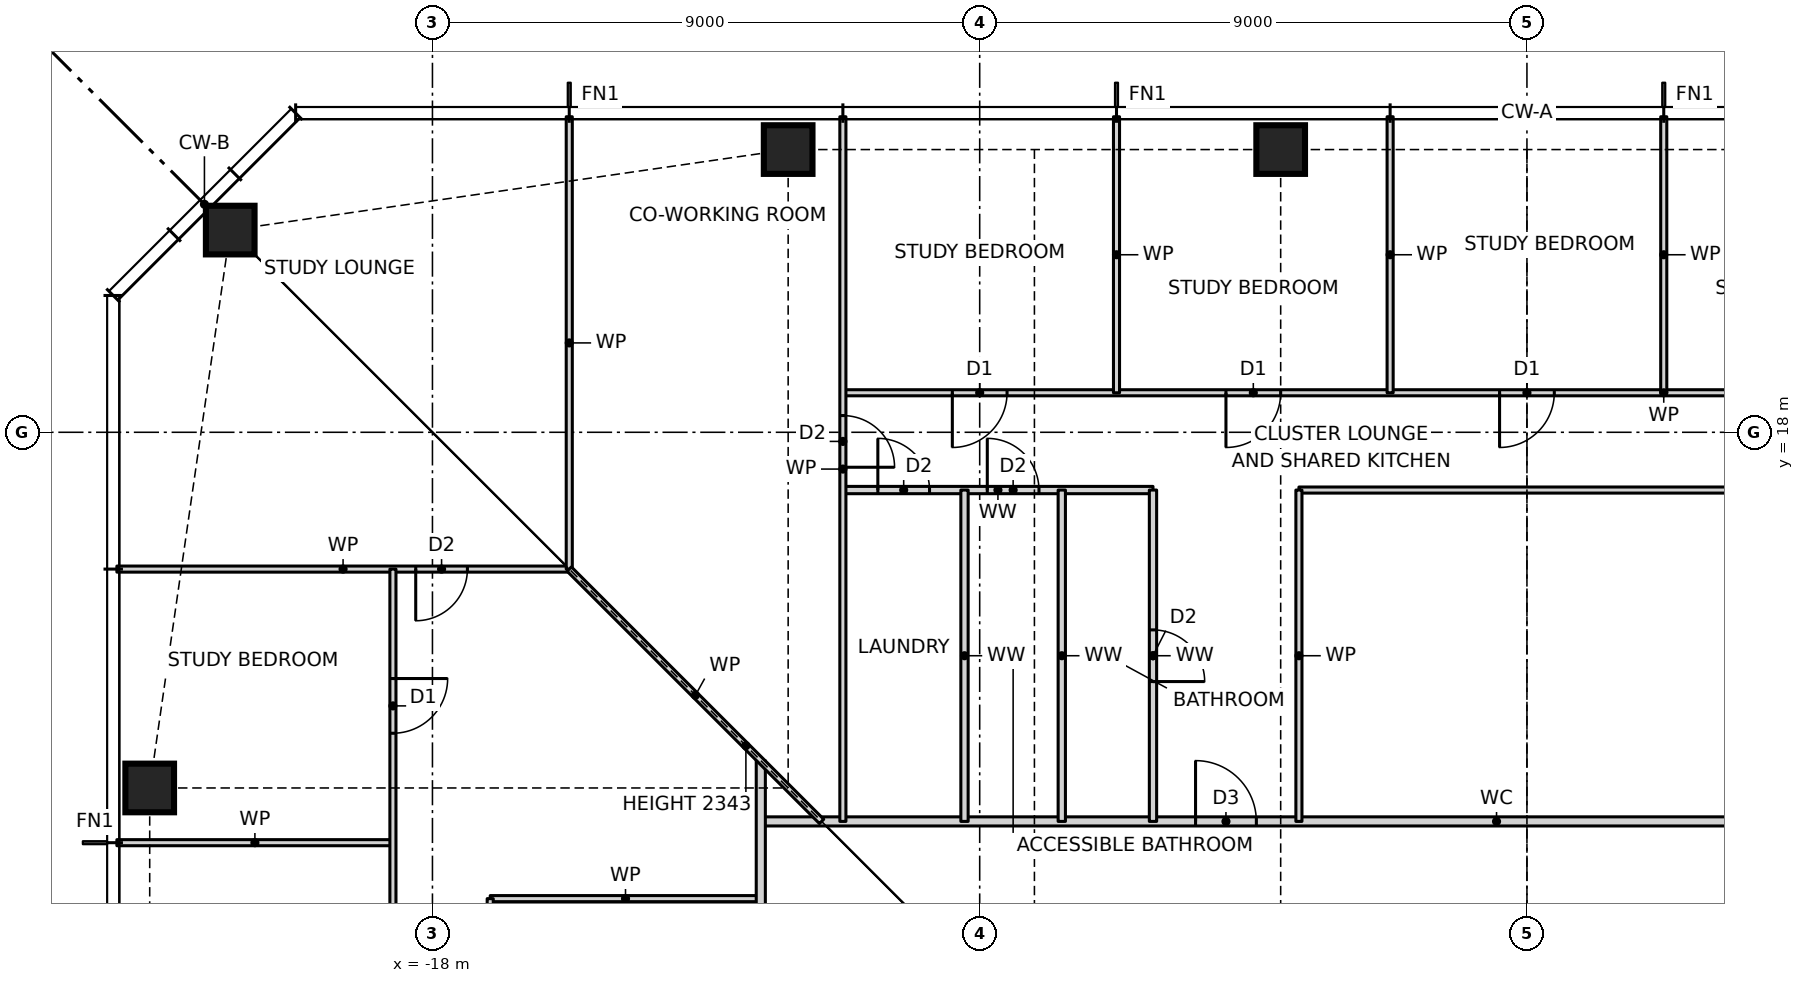
"""IFC4 building model, lengths in metres.
Left out: names, types, materials, properties, quantities, classifications, styles, units other than length and angle.
Written with IfcOpenShell. Run it as: python <this file> out.ifc"""

import sys

from ifc_helpers import new_model, si_unit, direction, frame, frame_2d, origin, origin_2d, place, context, subcontext, project, spatial, rectangle, hollow_rectangle, extrude, element, fill, save


model = new_model("IFC4")
c1 = context("Model", 3, precision=1e-05, world=origin(), true_north=direction((0.0, 1.0)))
c2 = subcontext(c1, "Body", "Model", "MODEL_VIEW")
j1 = project(units=[si_unit("LENGTHUNIT", "METRE"), si_unit("PLANEANGLEUNIT", "RADIAN")], contexts=[c1])
p1 = place(None, origin())
s1 = spatial("IfcSite", under=j1, at=p1, CompositionType="ELEMENT")
p2 = place(p1, origin())
s2 = spatial("IfcBuilding", under=s1, at=p2, CompositionType="ELEMENT")
p3 = place(p2, frame((0.0, 0.0, 46.5)))
s3 = spatial("IfcBuildingStorey", under=s2, at=p3, CompositionType="ELEMENT", Elevation=46.5)
for number, where, z_axis, x_axis in (
    (1, (-4.05, 22.65, 0.0), (0.0, 0.0, 1.0), (1.0, 0.0, 0.0)),
    (2, (-12.15, 22.65, 0.0), (0.0, 0.0, 1.0), (1.0, 0.0, 0.0)),
    (3, (-21.326, 21.326, 0.0), (0.0, 0.0, 1.0), (1.0, 0.0, 0.0)),
    (4, (-22.65, 12.15, 0.0), (0.0, 0.0, 1.0), (1.0, 0.0, 0.0)),
):
    element("IfcColumn", number, at=place(p3, frame(where, z_axis=z_axis, x_axis=x_axis)), inside=s3, PredefinedType="COLUMN", context=c2, shape_type="SweptSolid", body=[
        extrude(hollow_rectangle(XDim=0.8, YDim=0.8, WallThickness=0.09, at=origin_2d()), origin(), (0.0, 0.0, 1.0), 3.5),
    ])
p4 = place(p3, frame((-17.05, 10.33, 0.0), z_axis=(0.0, 0.0, 1.0), x_axis=(1.0, 0.0, 0.0)))
e5 = element("IfcWall", 5, at=p4, inside=s3, PredefinedType="PARTITIONING", context=c2, shape_type="SweptSolid", body=[
    extrude(rectangle(XDim=4.45, YDim=0.1, at=frame_2d((2.225, 0.0))), origin(), (0.0, 0.0, 1.0), 3.27),
])
p5 = place(p3, frame((-23.19, 11.25, 0.0), z_axis=(0.0, 0.0, 1.0), x_axis=(1.0, 0.0, 0.0)))
e6 = element("IfcWall", 6, at=p5, inside=s3, PredefinedType="PARTITIONING", context=c2, shape_type="SweptSolid", body=[
    extrude(rectangle(XDim=4.54, YDim=0.1, at=frame_2d((2.27, 0.0))), origin(), (0.0, 0.0, 1.0), 3.27),
])
p6 = place(p3, frame((-12.6, 11.6, 0.0), z_axis=(0.0, 0.0, 1.0), x_axis=(1.0, 0.0, 0.0)))
e7 = element("IfcWall", 7, at=p6, inside=s3, PredefinedType="PARTITIONING", context=c2, shape_type="SweptSolid", body=[
    extrude(rectangle(XDim=24.2, YDim=0.15, at=frame_2d((12.1, 0.0))), origin(), (0.0, 0.0, 1.0), 3.27),
])
p7 = place(p6, frame((7.15, 0.0, 0.0)))
e8 = element("IfcOpeningElement", 8, at=p7, cuts=e7, PredefinedType="OPENING", context=c2, shape_type="SweptSolid", body=[
    extrude(rectangle(XDim=1.0, YDim=2.1, at=frame_2d((0.5, 1.05))), frame((0.0, 0.085, 0.0), z_axis=(0.0, -1.0, 0.0), x_axis=(1.0, 0.0, 0.0)), (0.0, 0.0, 1.0), 0.17),
])
p8 = place(p3, frame((-23.19, 15.75, 0.0), z_axis=(0.0, 0.0, 1.0), x_axis=(1.0, 0.0, 0.0)))
e9 = element("IfcWall", 9, at=p8, inside=s3, PredefinedType="PARTITIONING", context=c2, shape_type="SweptSolid", body=[
    extrude(rectangle(XDim=7.44, YDim=0.1, at=frame_2d((3.72, 0.0))), origin(), (0.0, 0.0, 1.0), 3.27),
])
p9 = place(p8, frame((4.915, 0.0, 0.0)))
e10 = element("IfcOpeningElement", 10, at=p9, cuts=e9, PredefinedType="OPENING", context=c2, shape_type="SweptSolid", body=[
    extrude(rectangle(XDim=0.85, YDim=2.1, at=frame_2d((0.425, 1.05))), frame((0.0, 0.06, 0.0), z_axis=(0.0, -1.0, 0.0), x_axis=(1.0, 0.0, 0.0)), (0.0, 0.0, 1.0), 0.12),
])
p10 = place(p3, frame((-11.25, 17.05, 0.0), z_axis=(0.0, 0.0, 1.0), x_axis=(1.0, 0.0, 0.0)))
e11 = element("IfcWall", 11, at=p10, inside=s3, PredefinedType="PARTITIONING", context=c2, shape_type="SweptSolid", body=[
    extrude(rectangle(XDim=5.1, YDim=0.12, at=frame_2d((2.55, 0.0))), origin(), (0.0, 0.0, 1.0), 3.27),
])
p11 = place(p10, frame((2.375, 0.0, 0.0)))
e12 = element("IfcOpeningElement", 12, at=p11, cuts=e11, PredefinedType="OPENING", context=c2, shape_type="SweptSolid", body=[
    extrude(rectangle(XDim=0.85, YDim=2.1, at=frame_2d((0.425, 1.05))), frame((0.0, 0.07, 0.0), z_axis=(0.0, -1.0, 0.0), x_axis=(1.0, 0.0, 0.0)), (0.0, 0.0, 1.0), 0.14),
])
p12 = place(p10, frame((0.575, 0.0, 0.0)))
e13 = element("IfcOpeningElement", 13, at=p12, cuts=e11, PredefinedType="OPENING", context=c2, shape_type="SweptSolid", body=[
    extrude(rectangle(XDim=0.85, YDim=2.1, at=frame_2d((0.425, 1.05))), frame((0.0, 0.07, 0.0), z_axis=(0.0, -1.0, 0.0), x_axis=(1.0, 0.0, 0.0)), (0.0, 0.0, 1.0), 0.14),
])
p13 = place(p3, frame((-3.75, 17.05, 0.0), z_axis=(0.0, 0.0, 1.0), x_axis=(1.0, 0.0, 0.0)))
e14 = element("IfcWall", 14, at=p13, inside=s3, PredefinedType="PARTITIONING", context=c2, shape_type="SweptSolid", body=[
    extrude(rectangle(XDim=15.51, YDim=0.1, at=frame_2d((7.755, 0.0))), origin(), (0.0, 0.0, 1.0), 3.27),
])
p14 = place(p13, frame((7.33, 0.0, 0.0)))
e15 = element("IfcOpeningElement", 15, at=p14, cuts=e14, PredefinedType="OPENING", context=c2, shape_type="SweptSolid", body=[
    extrude(rectangle(XDim=0.85, YDim=2.1, at=frame_2d((0.425, 1.05))), frame((0.0, 0.06, 0.0), z_axis=(0.0, -1.0, 0.0), x_axis=(1.0, 0.0, 0.0)), (0.0, 0.0, 1.0), 0.12),
])
p15 = place(p3, frame((-11.25, 18.65, 0.0), z_axis=(0.0, 0.0, 1.0), x_axis=(1.0, 0.0, 0.0)))
e16 = element("IfcWall", 16, at=p15, inside=s3, PredefinedType="PARTITIONING", context=c2, shape_type="SweptSolid", body=[
    extrude(rectangle(XDim=27.0, YDim=0.1, at=frame_2d((13.5, 0.0))), origin(), (0.0, 0.0, 1.0), 3.27),
])
p16 = place(p15, frame((24.3, 0.0, 0.0)))
e17 = element("IfcOpeningElement", 17, at=p16, cuts=e16, PredefinedType="OPENING", context=c2, shape_type="SweptSolid", body=[
    extrude(rectangle(XDim=0.9, YDim=2.1, at=frame_2d((0.45, 1.05))), frame((0.0, 0.06, 0.0), z_axis=(0.0, -1.0, 0.0), x_axis=(1.0, 0.0, 0.0)), (0.0, 0.0, 1.0), 0.12),
])
p17 = place(p15, frame((19.8, 0.0, 0.0)))
e18 = element("IfcOpeningElement", 18, at=p17, cuts=e16, PredefinedType="OPENING", context=c2, shape_type="SweptSolid", body=[
    extrude(rectangle(XDim=0.9, YDim=2.1, at=frame_2d((0.45, 1.05))), frame((0.0, 0.06, 0.0), z_axis=(0.0, -1.0, 0.0), x_axis=(1.0, 0.0, 0.0)), (0.0, 0.0, 1.0), 0.12),
])
p18 = place(p15, frame((15.3, 0.0, 0.0)))
e19 = element("IfcOpeningElement", 19, at=p18, cuts=e16, PredefinedType="OPENING", context=c2, shape_type="SweptSolid", body=[
    extrude(rectangle(XDim=0.9, YDim=2.1, at=frame_2d((0.45, 1.05))), frame((0.0, 0.06, 0.0), z_axis=(0.0, -1.0, 0.0), x_axis=(1.0, 0.0, 0.0)), (0.0, 0.0, 1.0), 0.12),
])
p19 = place(p15, frame((10.8, 0.0, 0.0)))
e20 = element("IfcOpeningElement", 20, at=p19, cuts=e16, PredefinedType="OPENING", context=c2, shape_type="SweptSolid", body=[
    extrude(rectangle(XDim=0.9, YDim=2.1, at=frame_2d((0.45, 1.05))), frame((0.0, 0.06, 0.0), z_axis=(0.0, -1.0, 0.0), x_axis=(1.0, 0.0, 0.0)), (0.0, 0.0, 1.0), 0.12),
])
p20 = place(p15, frame((6.3, 0.0, 0.0)))
e21 = element("IfcOpeningElement", 21, at=p20, cuts=e16, PredefinedType="OPENING", context=c2, shape_type="SweptSolid", body=[
    extrude(rectangle(XDim=0.9, YDim=2.1, at=frame_2d((0.45, 1.05))), frame((0.0, 0.06, 0.0), z_axis=(0.0, -1.0, 0.0), x_axis=(1.0, 0.0, 0.0)), (0.0, 0.0, 1.0), 0.12),
])
p21 = place(p15, frame((1.8, 0.0, 0.0)))
e22 = element("IfcOpeningElement", 22, at=p21, cuts=e16, PredefinedType="OPENING", context=c2, shape_type="SweptSolid", body=[
    extrude(rectangle(XDim=0.9, YDim=2.1, at=frame_2d((0.45, 1.05))), frame((0.0, 0.06, 0.0), z_axis=(0.0, -1.0, 0.0), x_axis=(1.0, 0.0, 0.0)), (0.0, 0.0, 1.0), 0.12),
])
for number, where, z_axis, x_axis in (
    (23, (2.25, 18.65, 0.0), (0.0, 0.0, 1.0), (0.0, 1.0, 0.0)),
    (24, (-2.25, 18.65, 0.0), (0.0, 0.0, 1.0), (0.0, 1.0, 0.0)),
):
    element("IfcWall", number, at=place(p3, frame(where, z_axis=z_axis, x_axis=x_axis)), inside=s3, PredefinedType="PARTITIONING", context=c2, shape_type="SweptSolid", body=[
        extrude(rectangle(XDim=4.54, YDim=0.1, at=frame_2d((2.27, 0.0))), origin(), (0.0, 0.0, 1.0), 3.27),
    ])
p22 = place(p3, frame((-3.75, 11.6, 0.0), z_axis=(0.0, 0.0, 1.0), x_axis=(0.0, 1.0, 0.0)))
e25 = element("IfcWall", 25, at=p22, inside=s3, PredefinedType="PARTITIONING", context=c2, shape_type="SweptSolid", body=[
    extrude(rectangle(XDim=5.45, YDim=0.1, at=frame_2d((2.725, 0.0))), origin(), (0.0, 0.0, 1.0), 3.27),
])
p23 = place(p3, frame((-6.15, 11.6, 0.0), z_axis=(0.0, 0.0, 1.0), x_axis=(0.0, 1.0, 0.0)))
e26 = element("IfcWall", 26, at=p23, inside=s3, PredefinedType="PARTITIONING", context=c2, shape_type="SweptSolid", body=[
    extrude(rectangle(XDim=5.45, YDim=0.12, at=frame_2d((2.725, 0.0))), origin(), (0.0, 0.0, 1.0), 3.27),
])
p24 = place(p23, frame((2.3, 0.0, 0.0)))
e27 = element("IfcOpeningElement", 27, at=p24, cuts=e26, PredefinedType="OPENING", context=c2, shape_type="SweptSolid", body=[
    extrude(rectangle(XDim=0.85, YDim=2.1, at=frame_2d((0.425, 1.05))), frame((0.0, 0.07, 0.0), z_axis=(0.0, -1.0, 0.0), x_axis=(1.0, 0.0, 0.0)), (0.0, 0.0, 1.0), 0.14),
])
p25 = place(p3, frame((-6.75, 18.65, 0.0), z_axis=(0.0, 0.0, 1.0), x_axis=(0.0, 1.0, 0.0)))
e28 = element("IfcWall", 28, at=p25, inside=s3, PredefinedType="PARTITIONING", context=c2, shape_type="SweptSolid", body=[
    extrude(rectangle(XDim=4.54, YDim=0.1, at=frame_2d((2.27, 0.0))), origin(), (0.0, 0.0, 1.0), 3.27),
])
for number, where, z_axis, x_axis in (
    (29, (-7.65, 11.6, 0.0), (0.0, 0.0, 1.0), (0.0, 1.0, 0.0)),
    (30, (-9.25, 11.6, 0.0), (0.0, 0.0, 1.0), (0.0, 1.0, 0.0)),
):
    element("IfcWall", number, at=place(p3, frame(where, z_axis=z_axis, x_axis=x_axis)), inside=s3, PredefinedType="PARTITIONING", context=c2, shape_type="SweptSolid", body=[
        extrude(rectangle(XDim=5.45, YDim=0.12, at=frame_2d((2.725, 0.0))), origin(), (0.0, 0.0, 1.0), 3.27),
    ])
p26 = place(p3, frame((-11.25, 11.6, 0.0), z_axis=(0.0, 0.0, 1.0), x_axis=(0.0, 1.0, 0.0)))
e31 = element("IfcWall", 31, at=p26, inside=s3, PredefinedType="PARTITIONING", context=c2, shape_type="SweptSolid", body=[
    extrude(rectangle(XDim=11.59, YDim=0.1, at=frame_2d((5.795, 0.0))), origin(), (0.0, 0.0, 1.0), 3.27),
])
p27 = place(p26, frame((5.825, 0.0, 0.0)))
e32 = element("IfcOpeningElement", 32, at=p27, cuts=e31, PredefinedType="OPENING", context=c2, shape_type="SweptSolid", body=[
    extrude(rectangle(XDim=0.85, YDim=2.1, at=frame_2d((0.425, 1.05))), frame((0.0, 0.06, 0.0), z_axis=(0.0, -1.0, 0.0), x_axis=(1.0, 0.0, 0.0)), (0.0, 0.0, 1.0), 0.12),
])
p28 = place(p3, frame((-12.6, -12.6, 0.0), z_axis=(0.0, 0.0, 1.0), x_axis=(0.0, 1.0, 0.0)))
e33 = element("IfcWall", 33, at=p28, inside=s3, PredefinedType="PARTITIONING", context=c2, shape_type="SweptSolid", body=[
    extrude(rectangle(XDim=25.2, YDim=0.15, at=frame_2d((12.6, 0.0))), origin(), (0.0, 0.0, 1.0), 3.27),
])
p29 = place(p28, frame((7.15, 0.0, 0.0)))
e34 = element("IfcOpeningElement", 34, at=p29, cuts=e33, PredefinedType="OPENING", context=c2, shape_type="SweptSolid", body=[
    extrude(rectangle(XDim=1.0, YDim=2.1, at=frame_2d((0.5, 1.05))), frame((0.0, 0.085, 0.0), z_axis=(0.0, -1.0, 0.0), x_axis=(1.0, 0.0, 0.0)), (0.0, 0.0, 1.0), 0.17),
])
p30 = place(p3, frame((-15.75, 15.75, 0.0), z_axis=(0.0, 0.0, 1.0), x_axis=(0.0, 1.0, 0.0)))
e35 = element("IfcWall", 35, at=p30, inside=s3, PredefinedType="PARTITIONING", context=c2, shape_type="SweptSolid", body=[
    extrude(rectangle(XDim=7.44, YDim=0.1, at=frame_2d((3.72, 0.0))), origin(), (0.0, 0.0, 1.0), 3.27),
])
p31 = place(p3, frame((-17.05, -3.75, 0.0), z_axis=(0.0, 0.0, 1.0), x_axis=(0.0, 1.0, 0.0)))
e36 = element("IfcWall", 36, at=p31, inside=s3, PredefinedType="PARTITIONING", context=c2, shape_type="SweptSolid", body=[
    extrude(rectangle(XDim=14.08, YDim=0.1, at=frame_2d((7.04, 0.0))), origin(), (0.0, 0.0, 1.0), 3.27),
])
p32 = place(p31, frame((6.615, 0.0, 0.0)))
e37 = element("IfcOpeningElement", 37, at=p32, cuts=e36, PredefinedType="OPENING", context=c2, shape_type="SweptSolid", body=[
    extrude(rectangle(XDim=0.85, YDim=2.1, at=frame_2d((0.425, 1.05))), frame((0.0, 0.06, 0.0), z_axis=(0.0, -1.0, 0.0), x_axis=(1.0, 0.0, 0.0)), (0.0, 0.0, 1.0), 0.12),
])
p33 = place(p3, frame((-18.65, -11.25, 0.0), z_axis=(0.0, 0.0, 1.0), x_axis=(0.0, 1.0, 0.0)))
e38 = element("IfcWall", 38, at=p33, inside=s3, PredefinedType="PARTITIONING", context=c2, shape_type="SweptSolid", body=[
    extrude(rectangle(XDim=27.0, YDim=0.1, at=frame_2d((13.5, 0.0))), origin(), (0.0, 0.0, 1.0), 3.27),
])
p34 = place(p33, frame((24.3, 0.0, 0.0)))
e39 = element("IfcOpeningElement", 39, at=p34, cuts=e38, PredefinedType="OPENING", context=c2, shape_type="SweptSolid", body=[
    extrude(rectangle(XDim=0.9, YDim=2.1, at=frame_2d((0.45, 1.05))), frame((0.0, 0.06, 0.0), z_axis=(0.0, -1.0, 0.0), x_axis=(1.0, 0.0, 0.0)), (0.0, 0.0, 1.0), 0.12),
])
p35 = place(p33, frame((19.8, 0.0, 0.0)))
e40 = element("IfcOpeningElement", 40, at=p35, cuts=e38, PredefinedType="OPENING", context=c2, shape_type="SweptSolid", body=[
    extrude(rectangle(XDim=0.9, YDim=2.1, at=frame_2d((0.45, 1.05))), frame((0.0, 0.06, 0.0), z_axis=(0.0, -1.0, 0.0), x_axis=(1.0, 0.0, 0.0)), (0.0, 0.0, 1.0), 0.12),
])
p36 = place(p33, frame((15.3, 0.0, 0.0)))
e41 = element("IfcOpeningElement", 41, at=p36, cuts=e38, PredefinedType="OPENING", context=c2, shape_type="SweptSolid", body=[
    extrude(rectangle(XDim=0.9, YDim=2.1, at=frame_2d((0.45, 1.05))), frame((0.0, 0.06, 0.0), z_axis=(0.0, -1.0, 0.0), x_axis=(1.0, 0.0, 0.0)), (0.0, 0.0, 1.0), 0.12),
])
p37 = place(p33, frame((10.8, 0.0, 0.0)))
e42 = element("IfcOpeningElement", 42, at=p37, cuts=e38, PredefinedType="OPENING", context=c2, shape_type="SweptSolid", body=[
    extrude(rectangle(XDim=0.9, YDim=2.1, at=frame_2d((0.45, 1.05))), frame((0.0, 0.06, 0.0), z_axis=(0.0, -1.0, 0.0), x_axis=(1.0, 0.0, 0.0)), (0.0, 0.0, 1.0), 0.12),
])
p38 = place(p33, frame((6.3, 0.0, 0.0)))
e43 = element("IfcOpeningElement", 43, at=p38, cuts=e38, PredefinedType="OPENING", context=c2, shape_type="SweptSolid", body=[
    extrude(rectangle(XDim=0.9, YDim=2.1, at=frame_2d((0.45, 1.05))), frame((0.0, 0.06, 0.0), z_axis=(0.0, -1.0, 0.0), x_axis=(1.0, 0.0, 0.0)), (0.0, 0.0, 1.0), 0.12),
])
p39 = place(p33, frame((1.8, 0.0, 0.0)))
e44 = element("IfcOpeningElement", 44, at=p39, cuts=e38, PredefinedType="OPENING", context=c2, shape_type="SweptSolid", body=[
    extrude(rectangle(XDim=0.9, YDim=2.1, at=frame_2d((0.45, 1.05))), frame((0.0, 0.06, 0.0), z_axis=(0.0, -1.0, 0.0), x_axis=(1.0, 0.0, 0.0)), (0.0, 0.0, 1.0), 0.12),
])
p40 = place(p3, frame((-11.6, 11.6, 0.0), z_axis=(0.0, 0.0, 1.0), x_axis=(-0.707106781187, 0.707106781187, 0.0)))
e45 = element("IfcWall", 45, at=p40, inside=s3, PredefinedType="PARTITIONING", context=c2, shape_type="SweptSolid", body=[
    extrude(rectangle(XDim=5.869, YDim=0.1, at=frame_2d((2.935, 0.0))), origin(), (0.0, 0.0, 1.0), 2.343),
])
p41 = place(p19, frame((0.9, 0.0, 0.0), z_axis=(0.0, 0.0, 1.0), x_axis=(-1.0, 0.0, 0.0)))
e46 = element("IfcDoor", 46, at=p41, inside=s3, OperationType="SINGLE_SWING_RIGHT", PredefinedType="DOOR", context=c2, shape_type="SweptSolid", body=[
    extrude(rectangle(XDim=0.9, YDim=2.1, at=frame_2d((0.45, 1.05))), frame((0.0, 0.025, 0.0), z_axis=(0.0, -1.0, 0.0), x_axis=(1.0, 0.0, 0.0)), (0.0, 0.0, 1.0), 0.05),
])
fill(e20, e46)
p42 = place(p20, frame((0.9, 0.0, 0.0), z_axis=(0.0, 0.0, 1.0), x_axis=(-1.0, 0.0, 0.0)))
e47 = element("IfcDoor", 47, at=p42, inside=s3, OperationType="SINGLE_SWING_RIGHT", PredefinedType="DOOR", context=c2, shape_type="SweptSolid", body=[
    extrude(rectangle(XDim=0.9, YDim=2.1, at=frame_2d((0.45, 1.05))), frame((0.0, 0.025, 0.0), z_axis=(0.0, -1.0, 0.0), x_axis=(1.0, 0.0, 0.0)), (0.0, 0.0, 1.0), 0.05),
])
fill(e21, e47)
p43 = place(p21, frame((0.9, 0.0, 0.0), z_axis=(0.0, 0.0, 1.0), x_axis=(-1.0, 0.0, 0.0)))
e48 = element("IfcDoor", 48, at=p43, inside=s3, OperationType="SINGLE_SWING_RIGHT", PredefinedType="DOOR", context=c2, shape_type="SweptSolid", body=[
    extrude(rectangle(XDim=0.9, YDim=2.1, at=frame_2d((0.45, 1.05))), frame((0.0, 0.025, 0.0), z_axis=(0.0, -1.0, 0.0), x_axis=(1.0, 0.0, 0.0)), (0.0, 0.0, 1.0), 0.05),
])
fill(e22, e48)
p44 = place(p7, origin())
e49 = element("IfcDoor", 49, at=p44, inside=s3, OperationType="SINGLE_SWING_LEFT", PredefinedType="DOOR", context=c2, shape_type="SweptSolid", body=[
    extrude(rectangle(XDim=1.0, YDim=2.1, at=frame_2d((0.5, 1.05))), frame((0.0, 0.025, 0.0), z_axis=(0.0, -1.0, 0.0), x_axis=(1.0, 0.0, 0.0)), (0.0, 0.0, 1.0), 0.05),
])
fill(e8, e49)
p45 = place(p24, frame((0.85, 0.0, 0.0), z_axis=(0.0, 0.0, 1.0), x_axis=(-1.0, 0.0, 0.0)))
e50 = element("IfcDoor", 50, at=p45, inside=s3, OperationType="SINGLE_SWING_RIGHT", PredefinedType="DOOR", context=c2, shape_type="SweptSolid", body=[
    extrude(rectangle(XDim=0.85, YDim=2.1, at=frame_2d((0.425, 1.05))), frame((0.0, 0.025, 0.0), z_axis=(0.0, -1.0, 0.0), x_axis=(1.0, 0.0, 0.0)), (0.0, 0.0, 1.0), 0.05),
])
fill(e27, e50)
p46 = place(p11, origin())
e51 = element("IfcDoor", 51, at=p46, inside=s3, OperationType="SINGLE_SWING_LEFT", PredefinedType="DOOR", context=c2, shape_type="SweptSolid", body=[
    extrude(rectangle(XDim=0.85, YDim=2.1, at=frame_2d((0.425, 1.05))), frame((0.0, 0.025, 0.0), z_axis=(0.0, -1.0, 0.0), x_axis=(1.0, 0.0, 0.0)), (0.0, 0.0, 1.0), 0.05),
])
fill(e12, e51)
p47 = place(p12, origin())
e52 = element("IfcDoor", 52, at=p47, inside=s3, OperationType="SINGLE_SWING_LEFT", PredefinedType="DOOR", context=c2, shape_type="SweptSolid", body=[
    extrude(rectangle(XDim=0.85, YDim=2.1, at=frame_2d((0.425, 1.05))), frame((0.0, 0.025, 0.0), z_axis=(0.0, -1.0, 0.0), x_axis=(1.0, 0.0, 0.0)), (0.0, 0.0, 1.0), 0.05),
])
fill(e13, e52)
p48 = place(p27, frame((0.85, 0.0, 0.0), z_axis=(0.0, 0.0, 1.0), x_axis=(-1.0, 0.0, 0.0)))
e53 = element("IfcDoor", 53, at=p48, inside=s3, OperationType="SINGLE_SWING_RIGHT", PredefinedType="DOOR", context=c2, shape_type="SweptSolid", body=[
    extrude(rectangle(XDim=0.85, YDim=2.1, at=frame_2d((0.425, 1.05))), frame((0.0, 0.025, 0.0), z_axis=(0.0, -1.0, 0.0), x_axis=(1.0, 0.0, 0.0)), (0.0, 0.0, 1.0), 0.05),
])
fill(e32, e53)
p49 = place(p34, frame((0.9, 0.0, 0.0), z_axis=(0.0, 0.0, 1.0), x_axis=(-1.0, 0.0, 0.0)))
e54 = element("IfcDoor", 54, at=p49, inside=s3, OperationType="SINGLE_SWING_LEFT", PredefinedType="DOOR", context=c2, shape_type="SweptSolid", body=[
    extrude(rectangle(XDim=0.9, YDim=2.1, at=frame_2d((0.45, 1.05))), frame((0.0, 0.025, 0.0), z_axis=(0.0, -1.0, 0.0), x_axis=(1.0, 0.0, 0.0)), (0.0, 0.0, 1.0), 0.05),
])
fill(e39, e54)
p50 = place(p9, frame((0.85, 0.0, 0.0), z_axis=(0.0, 0.0, 1.0), x_axis=(-1.0, 0.0, 0.0)))
e55 = element("IfcDoor", 55, at=p50, inside=s3, OperationType="SINGLE_SWING_RIGHT", PredefinedType="DOOR", context=c2, shape_type="SweptSolid", body=[
    extrude(rectangle(XDim=0.85, YDim=2.1, at=frame_2d((0.425, 1.05))), frame((0.0, 0.025, 0.0), z_axis=(0.0, -1.0, 0.0), x_axis=(1.0, 0.0, 0.0)), (0.0, 0.0, 1.0), 0.05),
])
fill(e10, e55)
save(model, sys.argv[1])
